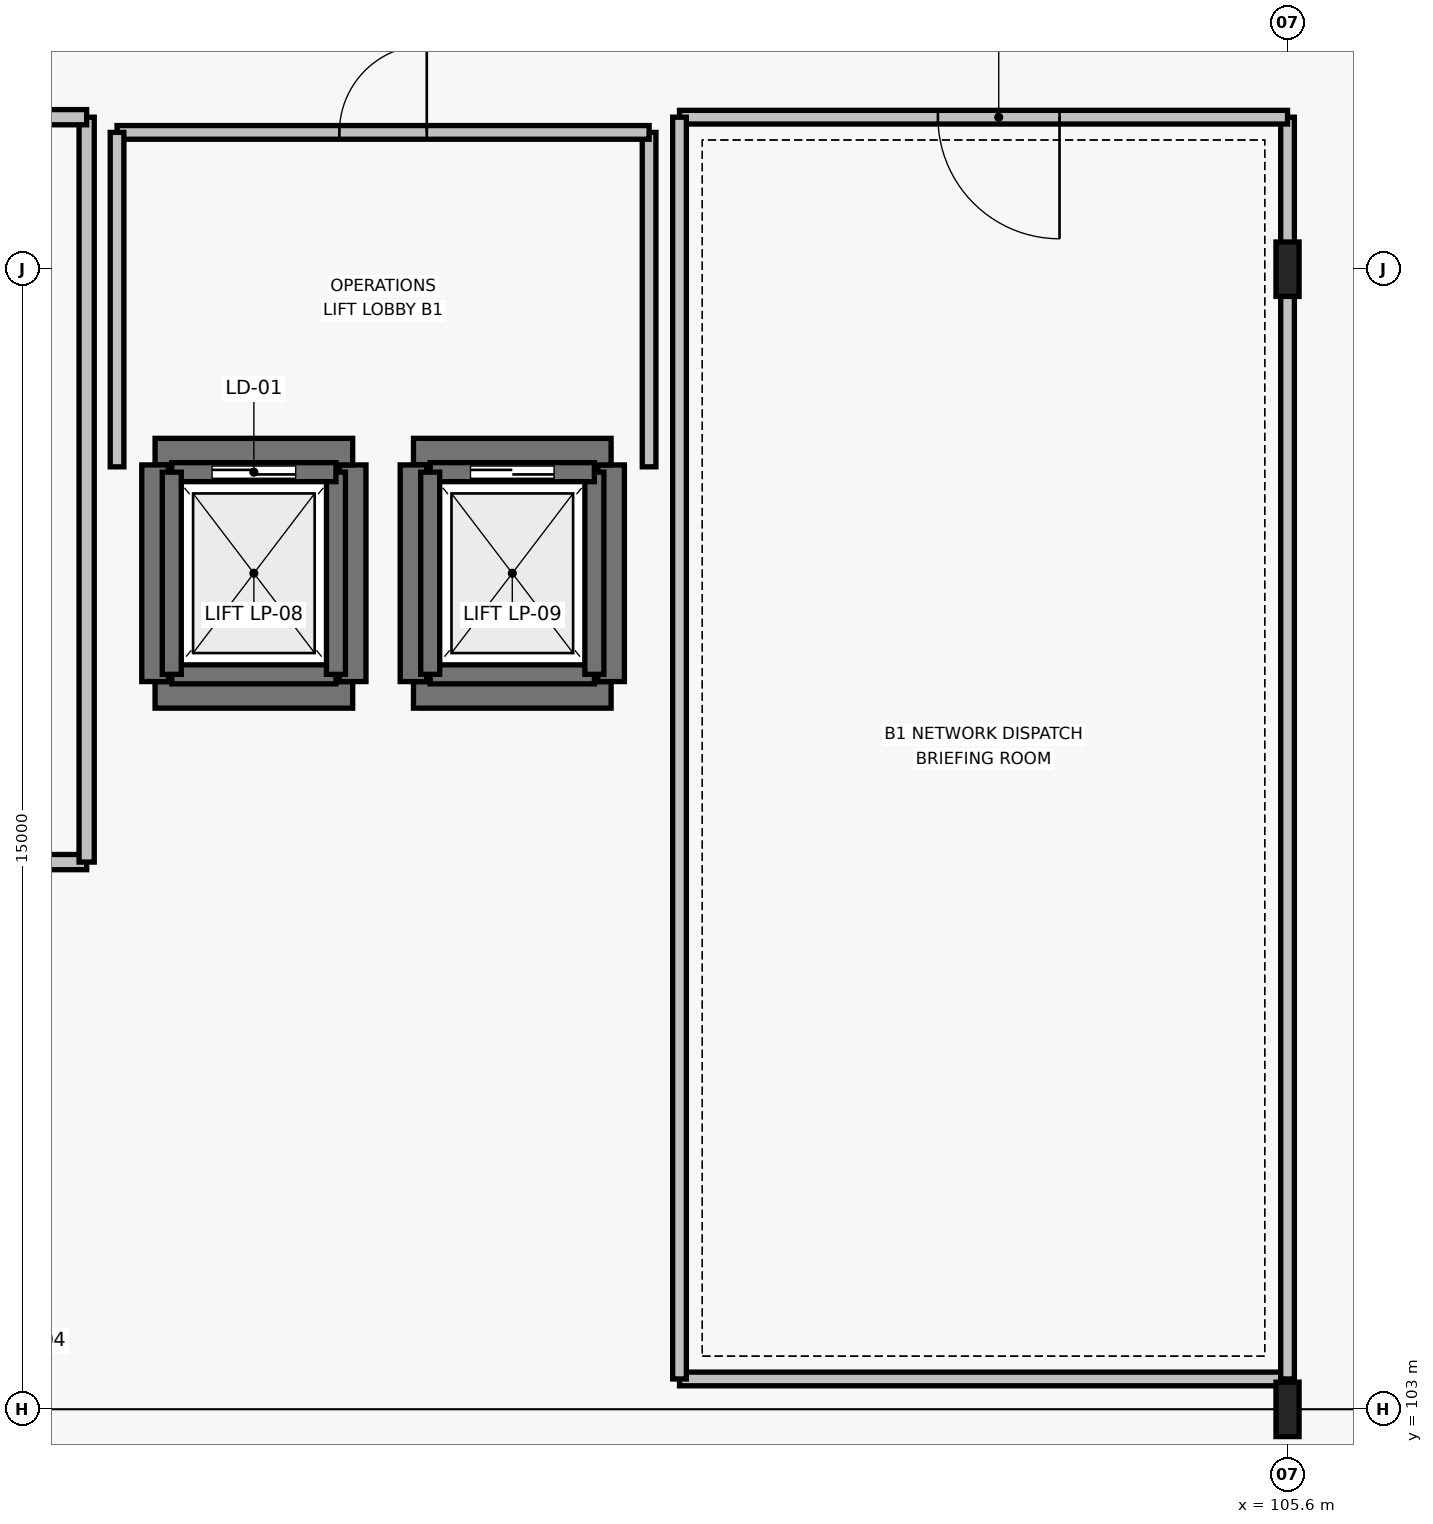
"""IFC4 building model, lengths in metres.
Left out: names, types, materials, properties, quantities, classifications, styles, units other than length and angle.
Written with IfcOpenShell. Run it as: python <this file> out.ifc"""

import sys

from ifc_helpers import new_model, si_unit, direction, frame, frame_2d, origin, origin_2d, place, context, subcontext, project, spatial, rectangle, i_section, extrude, element, fill, save


model = new_model("IFC4")
c1 = context("Model", 3, precision=1e-05, world=origin(), true_north=direction((0.0, 1.0)))
c2 = subcontext(c1, "Body", "Model", "MODEL_VIEW")
j1 = project(units=[si_unit("LENGTHUNIT", "METRE"), si_unit("PLANEANGLEUNIT", "RADIAN")], contexts=[c1])
p1 = place(None, origin())
s1 = spatial("IfcSite", under=j1, at=p1, CompositionType="ELEMENT")
p2 = place(p1, origin())
s2 = spatial("IfcBuilding", under=s1, at=p2, CompositionType="ELEMENT")
p3 = place(p2, frame((0.0, 0.0, -6.0)))
s3 = spatial("IfcBuildingStorey", under=s2, at=p3, CompositionType="ELEMENT", Elevation=-6.0)
for number, where, z_axis, x_axis in (
    (1, (105.6, 103.0, 0.0), (0.0, 0.0, 1.0), (1.0, 0.0, 0.0)),
    (2, (105.6, 118.0, 0.0), (0.0, 0.0, 1.0), (1.0, 0.0, 0.0)),
):
    element("IfcColumn", number, at=place(p3, frame(where, z_axis=z_axis, x_axis=x_axis)), inside=s3, PredefinedType="COLUMN", context=c2, shape_type="SweptSolid", body=[
        extrude(i_section(OverallWidth=0.304, OverallDepth=0.716, WebThickness=0.021, FlangeThickness=0.04, FilletRadius=0.027, at=origin_2d()), origin(), (0.0, 0.0, 1.0), 6.0),
    ])
p4 = place(p3, frame((90.7, 112.4, -1.2), z_axis=(0.0, 0.0, 1.0), x_axis=(1.0, 0.0, 0.0)))
e3 = element("IfcWall", 3, at=p4, inside=s3, PredefinedType="SOLIDWALL", context=c2, shape_type="SweptSolid", body=[
    extrude(rectangle(XDim=2.6, YDim=0.35, at=frame_2d((1.3, 0.0))), origin(), (0.0, 0.0, 1.0), 1.2),
])
p5 = place(p3, frame((93.3, 112.575, -1.2), z_axis=(0.0, 0.0, 1.0), x_axis=(0.0, 1.0, 0.0)))
e4 = element("IfcWall", 4, at=p5, inside=s3, PredefinedType="SOLIDWALL", context=c2, shape_type="SweptSolid", body=[
    extrude(rectangle(XDim=2.85, YDim=0.35, at=frame_2d((1.425, 0.0))), origin(), (0.0, 0.0, 1.0), 1.2),
])
p6 = place(p3, frame((93.3, 115.6, -1.2), z_axis=(0.0, 0.0, 1.0), x_axis=(-1.0, 0.0, 0.0)))
e5 = element("IfcWall", 5, at=p6, inside=s3, PredefinedType="SOLIDWALL", context=c2, shape_type="SweptSolid", body=[
    extrude(rectangle(XDim=2.6, YDim=0.35, at=frame_2d((1.3, 0.0))), origin(), (0.0, 0.0, 1.0), 1.2),
])
p7 = place(p3, frame((90.7, 115.425, -1.2), z_axis=(0.0, 0.0, 1.0), x_axis=(0.0, -1.0, 0.0)))
e6 = element("IfcWall", 6, at=p7, inside=s3, PredefinedType="SOLIDWALL", context=c2, shape_type="SweptSolid", body=[
    extrude(rectangle(XDim=2.85, YDim=0.35, at=frame_2d((1.425, 0.0))), origin(), (0.0, 0.0, 1.0), 1.2),
])
p8 = place(p3, frame((94.1, 112.4, -1.2), z_axis=(0.0, 0.0, 1.0), x_axis=(1.0, 0.0, 0.0)))
e7 = element("IfcWall", 7, at=p8, inside=s3, PredefinedType="SOLIDWALL", context=c2, shape_type="SweptSolid", body=[
    extrude(rectangle(XDim=2.6, YDim=0.35, at=frame_2d((1.3, 0.0))), origin(), (0.0, 0.0, 1.0), 1.2),
])
p9 = place(p3, frame((96.7, 112.575, -1.2), z_axis=(0.0, 0.0, 1.0), x_axis=(0.0, 1.0, 0.0)))
e8 = element("IfcWall", 8, at=p9, inside=s3, PredefinedType="SOLIDWALL", context=c2, shape_type="SweptSolid", body=[
    extrude(rectangle(XDim=2.85, YDim=0.35, at=frame_2d((1.425, 0.0))), origin(), (0.0, 0.0, 1.0), 1.2),
])
p10 = place(p3, frame((96.7, 115.6, -1.2), z_axis=(0.0, 0.0, 1.0), x_axis=(-1.0, 0.0, 0.0)))
e9 = element("IfcWall", 9, at=p10, inside=s3, PredefinedType="SOLIDWALL", context=c2, shape_type="SweptSolid", body=[
    extrude(rectangle(XDim=2.6, YDim=0.35, at=frame_2d((1.3, 0.0))), origin(), (0.0, 0.0, 1.0), 1.2),
])
p11 = place(p3, frame((94.1, 115.425, -1.2), z_axis=(0.0, 0.0, 1.0), x_axis=(0.0, -1.0, 0.0)))
e10 = element("IfcWall", 10, at=p11, inside=s3, PredefinedType="SOLIDWALL", context=c2, shape_type="SweptSolid", body=[
    extrude(rectangle(XDim=2.85, YDim=0.35, at=frame_2d((1.425, 0.0))), origin(), (0.0, 0.0, 1.0), 1.2),
])
p12 = place(p3, frame((90.92, 112.67, 0.0), z_axis=(0.0, 0.0, 1.0), x_axis=(1.0, 0.0, 0.0)))
e11 = element("IfcWall", 11, at=p12, inside=s3, PredefinedType="SHEAR", context=c2, shape_type="SweptSolid", body=[
    extrude(rectangle(XDim=2.16, YDim=0.25, at=frame_2d((1.08, 0.0))), origin(), (0.0, 0.0, 1.0), 5.76),
])
p13 = place(p3, frame((93.08, 112.67, 0.0), z_axis=(0.0, 0.0, 1.0), x_axis=(0.0, 1.0, 0.0)))
e12 = element("IfcWall", 12, at=p13, inside=s3, PredefinedType="SHEAR", context=c2, shape_type="SweptSolid", body=[
    extrude(rectangle(XDim=2.66, YDim=0.25, at=frame_2d((1.33, 0.0))), origin(), (0.0, 0.0, 1.0), 5.76),
])
p14 = place(p3, frame((93.08, 115.33, 0.0), z_axis=(0.0, 0.0, 1.0), x_axis=(-1.0, 0.0, 0.0)))
e13 = element("IfcWall", 13, at=p14, inside=s3, PredefinedType="SHEAR", context=c2, shape_type="SweptSolid", body=[
    extrude(rectangle(XDim=2.16, YDim=0.25, at=frame_2d((1.08, 0.0))), origin(), (0.0, 0.0, 1.0), 5.76),
])
p15 = place(p14, frame((0.53, 0.0, 0.0)))
e14 = element("IfcOpeningElement", 14, at=p15, cuts=e13, PredefinedType="OPENING", context=c2, shape_type="SweptSolid", body=[
    extrude(rectangle(XDim=1.1, YDim=2.2, at=frame_2d((0.55, 1.1))), frame((0.0, 0.135, 0.0), z_axis=(0.0, -1.0, 0.0), x_axis=(1.0, 0.0, 0.0)), (0.0, 0.0, 1.0), 0.27),
])
p16 = place(p3, frame((90.92, 115.33, 0.0), z_axis=(0.0, 0.0, 1.0), x_axis=(0.0, -1.0, 0.0)))
e15 = element("IfcWall", 15, at=p16, inside=s3, PredefinedType="SHEAR", context=c2, shape_type="SweptSolid", body=[
    extrude(rectangle(XDim=2.66, YDim=0.25, at=frame_2d((1.33, 0.0))), origin(), (0.0, 0.0, 1.0), 5.76),
])
p17 = place(p3, frame((94.32, 112.67, 0.0), z_axis=(0.0, 0.0, 1.0), x_axis=(1.0, 0.0, 0.0)))
e16 = element("IfcWall", 16, at=p17, inside=s3, PredefinedType="SHEAR", context=c2, shape_type="SweptSolid", body=[
    extrude(rectangle(XDim=2.16, YDim=0.25, at=frame_2d((1.08, 0.0))), origin(), (0.0, 0.0, 1.0), 5.76),
])
p18 = place(p3, frame((96.48, 112.67, 0.0), z_axis=(0.0, 0.0, 1.0), x_axis=(0.0, 1.0, 0.0)))
e17 = element("IfcWall", 17, at=p18, inside=s3, PredefinedType="SHEAR", context=c2, shape_type="SweptSolid", body=[
    extrude(rectangle(XDim=2.66, YDim=0.25, at=frame_2d((1.33, 0.0))), origin(), (0.0, 0.0, 1.0), 5.76),
])
p19 = place(p3, frame((96.48, 115.33, 0.0), z_axis=(0.0, 0.0, 1.0), x_axis=(-1.0, 0.0, 0.0)))
e18 = element("IfcWall", 18, at=p19, inside=s3, PredefinedType="SHEAR", context=c2, shape_type="SweptSolid", body=[
    extrude(rectangle(XDim=2.16, YDim=0.25, at=frame_2d((1.08, 0.0))), origin(), (0.0, 0.0, 1.0), 5.76),
])
p20 = place(p19, frame((0.53, 0.0, 0.0)))
e19 = element("IfcOpeningElement", 19, at=p20, cuts=e18, PredefinedType="OPENING", context=c2, shape_type="SweptSolid", body=[
    extrude(rectangle(XDim=1.1, YDim=2.2, at=frame_2d((0.55, 1.1))), frame((0.0, 0.135, 0.0), z_axis=(0.0, -1.0, 0.0), x_axis=(1.0, 0.0, 0.0)), (0.0, 0.0, 1.0), 0.27),
])
p21 = place(p3, frame((94.32, 115.33, 0.0), z_axis=(0.0, 0.0, 1.0), x_axis=(0.0, -1.0, 0.0)))
e20 = element("IfcWall", 20, at=p21, inside=s3, PredefinedType="SHEAR", context=c2, shape_type="SweptSolid", body=[
    extrude(rectangle(XDim=2.66, YDim=0.25, at=frame_2d((1.33, 0.0))), origin(), (0.0, 0.0, 1.0), 5.76),
])
p22 = place(p3, frame((97.2, 115.4, 0.0), z_axis=(0.0, 0.0, 1.0), x_axis=(0.0, 1.0, 0.0)))
e21 = element("IfcWall", 21, at=p22, inside=s3, PredefinedType="PARTITIONING", context=c2, shape_type="SweptSolid", body=[
    extrude(rectangle(XDim=4.4, YDim=0.18, at=frame_2d((2.2, 0.0))), origin(), (0.0, 0.0, 1.0), 5.75),
])
p23 = place(p3, frame((97.2, 119.8, 0.0), z_axis=(0.0, 0.0, 1.0), x_axis=(-1.0, 0.0, 0.0)))
e22 = element("IfcWall", 22, at=p23, inside=s3, PredefinedType="PARTITIONING", context=c2, shape_type="SweptSolid", body=[
    extrude(rectangle(XDim=7.0, YDim=0.18, at=frame_2d((3.5, 0.0))), origin(), (0.0, 0.0, 1.0), 5.75),
])
p24 = place(p23, frame((4.075, 0.0, 0.0), z_axis=(0.0, 0.0, 1.0), x_axis=(-1.0, 0.0, 0.0)))
e23 = element("IfcOpeningElement", 23, at=p24, cuts=e22, PredefinedType="OPENING", context=c2, shape_type="SweptSolid", body=[
    extrude(rectangle(XDim=1.15, YDim=2.2, at=frame_2d((0.575, 1.1))), frame((0.0, 0.1, 0.0), z_axis=(0.0, -1.0, 0.0), x_axis=(1.0, 0.0, 0.0)), (0.0, 0.0, 1.0), 0.2),
])
p25 = place(p3, frame((90.2, 119.8, 0.0), z_axis=(0.0, 0.0, 1.0), x_axis=(0.0, -1.0, 0.0)))
e24 = element("IfcWall", 24, at=p25, inside=s3, PredefinedType="PARTITIONING", context=c2, shape_type="SweptSolid", body=[
    extrude(rectangle(XDim=4.4, YDim=0.18, at=frame_2d((2.2, 0.0))), origin(), (0.0, 0.0, 1.0), 5.75),
])
p26 = place(p3, frame((82.6, 110.2, 0.0), z_axis=(0.0, 0.0, 1.0), x_axis=(1.0, 0.0, 0.0)))
e25 = element("IfcWall", 25, at=p26, inside=s3, PredefinedType="PARTITIONING", context=c2, shape_type="SweptSolid", body=[
    extrude(rectangle(XDim=7.2, YDim=0.2, at=frame_2d((3.6, 0.0))), origin(), (0.0, 0.0, 1.0), 5.75),
])
p27 = place(p3, frame((89.8, 110.2, 0.0), z_axis=(0.0, 0.0, 1.0), x_axis=(0.0, 1.0, 0.0)))
e26 = element("IfcWall", 26, at=p27, inside=s3, PredefinedType="PARTITIONING", context=c2, shape_type="SweptSolid", body=[
    extrude(rectangle(XDim=9.8, YDim=0.2, at=frame_2d((4.9, 0.0))), origin(), (0.0, 0.0, 1.0), 5.75),
])
p28 = place(p3, frame((89.8, 120.0, 0.0), z_axis=(0.0, 0.0, 1.0), x_axis=(-1.0, 0.0, 0.0)))
e27 = element("IfcWall", 27, at=p28, inside=s3, PredefinedType="PARTITIONING", context=c2, shape_type="SweptSolid", body=[
    extrude(rectangle(XDim=7.2, YDim=0.2, at=frame_2d((3.6, 0.0))), origin(), (0.0, 0.0, 1.0), 5.75),
])
p29 = place(p28, frame((4.5, 0.0, 0.0), z_axis=(0.0, 0.0, 1.0), x_axis=(-1.0, 0.0, 0.0)))
e28 = element("IfcOpeningElement", 28, at=p29, cuts=e27, PredefinedType="OPENING", context=c2, shape_type="SweptSolid", body=[
    extrude(rectangle(XDim=1.4, YDim=2.2, at=frame_2d((0.7, 1.1))), frame((0.0, 0.11, 0.0), z_axis=(0.0, -1.0, 0.0), x_axis=(1.0, 0.0, 0.0)), (0.0, 0.0, 1.0), 0.22),
])
p30 = place(p3, frame((97.6, 103.4, 0.0), z_axis=(0.0, 0.0, 1.0), x_axis=(1.0, 0.0, 0.0)))
e29 = element("IfcWall", 29, at=p30, inside=s3, PredefinedType="PARTITIONING", context=c2, shape_type="SweptSolid", body=[
    extrude(rectangle(XDim=8.0, YDim=0.18, at=frame_2d((4.0, 0.0))), origin(), (0.0, 0.0, 1.0), 5.355),
])
p31 = place(p3, frame((105.6, 103.4, 0.0), z_axis=(0.0, 0.0, 1.0), x_axis=(0.0, 1.0, 0.0)))
e30 = element("IfcWall", 30, at=p31, inside=s3, PredefinedType="PARTITIONING", context=c2, shape_type="SweptSolid", body=[
    extrude(rectangle(XDim=16.6, YDim=0.18, at=frame_2d((8.3, 0.0))), origin(), (0.0, 0.0, 1.0), 5.255),
])
p32 = place(p3, frame((105.6, 120.0, 0.0), z_axis=(0.0, 0.0, 1.0), x_axis=(-1.0, 0.0, 0.0)))
e31 = element("IfcWall", 31, at=p32, inside=s3, PredefinedType="PARTITIONING", context=c2, shape_type="SweptSolid", body=[
    extrude(rectangle(XDim=8.0, YDim=0.18, at=frame_2d((4.0, 0.0))), origin(), (0.0, 0.0, 1.0), 5.75),
])
p33 = place(p32, frame((3.0, 0.0, 0.0)))
e32 = element("IfcOpeningElement", 32, at=p33, cuts=e31, PredefinedType="OPENING", context=c2, shape_type="SweptSolid", body=[
    extrude(rectangle(XDim=1.6, YDim=2.25, at=frame_2d((0.8, 1.125))), frame((0.0, 0.1, 0.0), z_axis=(0.0, -1.0, 0.0), x_axis=(1.0, 0.0, 0.0)), (0.0, 0.0, 1.0), 0.2),
])
p34 = place(p3, frame((97.6, 120.0, 0.0), z_axis=(0.0, 0.0, 1.0), x_axis=(0.0, -1.0, 0.0)))
e33 = element("IfcWall", 33, at=p34, inside=s3, PredefinedType="PARTITIONING", context=c2, shape_type="SweptSolid", body=[
    extrude(rectangle(XDim=16.6, YDim=0.18, at=frame_2d((8.3, 0.0))), origin(), (0.0, 0.0, 1.0), 5.75),
])
p35 = place(p15, origin())
e34 = element("IfcDoor", 34, at=p35, inside=s3, OperationType="SLIDING_TO_LEFT", PredefinedType="DOOR", context=c2, shape_type="SweptSolid", body=[
    extrude(rectangle(XDim=1.1, YDim=2.2, at=frame_2d((0.55, 1.1))), frame((0.0, 0.025, 0.0), z_axis=(0.0, -1.0, 0.0), x_axis=(1.0, 0.0, 0.0)), (0.0, 0.0, 1.0), 0.05),
])
fill(e14, e34)
p36 = place(p20, origin())
e35 = element("IfcDoor", 35, at=p36, inside=s3, OperationType="SLIDING_TO_LEFT", PredefinedType="DOOR", context=c2, shape_type="SweptSolid", body=[
    extrude(rectangle(XDim=1.1, YDim=2.2, at=frame_2d((0.55, 1.1))), frame((0.0, 0.025, 0.0), z_axis=(0.0, -1.0, 0.0), x_axis=(1.0, 0.0, 0.0)), (0.0, 0.0, 1.0), 0.05),
])
fill(e19, e35)
p37 = place(p24, origin())
e36 = element("IfcDoor", 36, at=p37, inside=s3, OperationType="SINGLE_SWING_LEFT", PredefinedType="DOOR", context=c2, shape_type="SweptSolid", body=[
    extrude(rectangle(XDim=1.15, YDim=2.2, at=frame_2d((0.575, 1.1))), frame((0.0, 0.025, 0.0), z_axis=(0.0, -1.0, 0.0), x_axis=(1.0, 0.0, 0.0)), (0.0, 0.0, 1.0), 0.05),
])
fill(e23, e36)
p38 = place(p33, origin())
e37 = element("IfcDoor", 37, at=p38, inside=s3, OperationType="SINGLE_SWING_LEFT", PredefinedType="DOOR", context=c2, shape_type="SweptSolid", body=[
    extrude(rectangle(XDim=1.6, YDim=2.25, at=frame_2d((0.8, 1.125))), frame((0.0, 0.025, 0.0), z_axis=(0.0, -1.0, 0.0), x_axis=(1.0, 0.0, 0.0)), (0.0, 0.0, 1.0), 0.05),
])
fill(e32, e37)
save(model, sys.argv[1])
